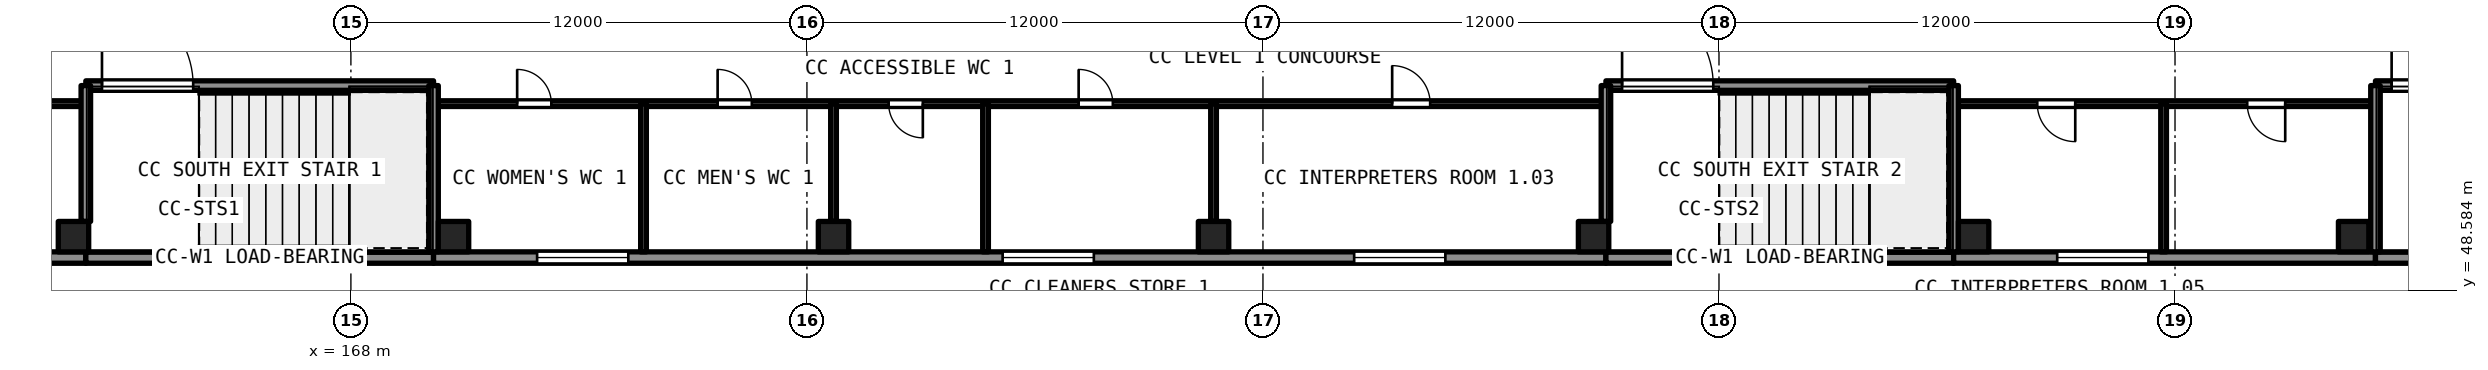
"""IFC4 building model, lengths in metres.
Left out: names, types, materials, properties, quantities, classifications, styles, units other than length and angle.
Written with IfcOpenShell. Run it as: python <this file> out.ifc"""

import sys

from ifc_helpers import new_model, si_unit, direction, frame, frame_2d, origin, origin_2d, place, context, subcontext, project, spatial, rectangle, extrude, element, fill, save


model = new_model("IFC4")
c1 = context("Model", 3, precision=1e-05, world=origin(), true_north=direction((0.0, 1.0)))
c2 = subcontext(c1, "Body", "Model", "MODEL_VIEW")
j1 = project(units=[si_unit("LENGTHUNIT", "METRE"), si_unit("PLANEANGLEUNIT", "RADIAN")], contexts=[c1])
p1 = place(None, origin())
s1 = spatial("IfcSite", under=j1, at=p1, CompositionType="ELEMENT")
p2 = place(p1, origin())
s2 = spatial("IfcBuilding", under=s1, at=p2, CompositionType="ELEMENT")
p3 = place(p2, frame((0.0, 0.0, 9.0)))
s3 = spatial("IfcBuildingStorey", under=s2, at=p3, CompositionType="ELEMENT", Elevation=9.0)
for number, where, z_axis, x_axis in (
    (1, (160.7, 50.0, 0.0), (0.0, 0.0, 1.0), (1.0, 0.0, 0.0)),
    (2, (170.7, 50.0, 0.0), (0.0, 0.0, 1.0), (1.0, 0.0, 0.0)),
    (3, (180.7, 50.0, 0.0), (0.0, 0.0, 1.0), (1.0, 0.0, 0.0)),
    (4, (190.7, 50.0, 0.0), (0.0, 0.0, 1.0), (1.0, 0.0, 0.0)),
    (5, (200.7, 50.0, 0.0), (0.0, 0.0, 1.0), (1.0, 0.0, 0.0)),
    (6, (210.7, 50.0, 0.0), (0.0, 0.0, 1.0), (1.0, 0.0, 0.0)),
    (7, (220.7, 50.0, 0.0), (0.0, 0.0, 1.0), (1.0, 0.0, 0.0)),
):
    element("IfcColumn", number, at=place(p3, frame(where, z_axis=z_axis, x_axis=x_axis)), inside=s3, PredefinedType="COLUMN", context=c2, shape_type="SweptSolid", body=[
        extrude(rectangle(XDim=0.8, YDim=0.8, at=origin_2d()), origin(), (0.0, 0.0, 1.0), 6.0),
    ])
p4 = place(p3, frame((150.15, 49.45, 0.0), z_axis=(0.0, 0.0, 1.0), x_axis=(1.0, 0.0, 0.0)))
e8 = element("IfcWall", 8, at=p4, inside=s3, PredefinedType="SOLIDWALL", context=c2, shape_type="SweptSolid", body=[
    extrude(rectangle(XDim=10.875, YDim=0.3, at=frame_2d((5.438, 0.0))), origin(), (0.0, 0.0, 1.0), 5.59),
])
p5 = place(p4, frame((4.25, 0.0, 0.9)))
e9 = element("IfcOpeningElement", 9, at=p5, cuts=e8, PredefinedType="OPENING", context=c2, shape_type="SweptSolid", body=[
    extrude(rectangle(XDim=2.4, YDim=1.8, at=frame_2d((1.2, 0.9))), frame((0.0, 0.161, 0.0), z_axis=(0.0, -1.0, 0.0), x_axis=(1.0, 0.0, 0.0)), (0.0, 0.0, 1.0), 0.321),
])
p6 = place(p3, frame((161.025, 49.45, 0.0), z_axis=(0.0, 0.0, 1.0), x_axis=(1.0, 0.0, 0.0)))
e10 = element("IfcWall", 10, at=p6, inside=s3, PredefinedType="SOLIDWALL", context=c2, shape_type="SweptSolid", body=[
    extrude(rectangle(XDim=9.15, YDim=0.3, at=frame_2d((4.575, 0.0))), origin(), (0.0, 0.0, 1.0), 5.59),
])
p7 = place(p6, frame((3.375, 0.0, 0.9)))
e11 = element("IfcOpeningElement", 11, at=p7, cuts=e10, PredefinedType="OPENING", context=c2, shape_type="SweptSolid", body=[
    extrude(rectangle(XDim=2.4, YDim=1.8, at=frame_2d((1.2, 0.9))), frame((0.0, 0.161, 0.0), z_axis=(0.0, -1.0, 0.0), x_axis=(1.0, 0.0, 0.0)), (0.0, 0.0, 1.0), 0.321),
])
p8 = place(p3, frame((170.175, 49.45, 0.0), z_axis=(0.0, 0.0, 1.0), x_axis=(1.0, 0.0, 0.0)))
e12 = element("IfcWall", 12, at=p8, inside=s3, PredefinedType="SOLIDWALL", context=c2, shape_type="SweptSolid", body=[
    extrude(rectangle(XDim=30.85, YDim=0.3, at=frame_2d((15.425, 0.0))), origin(), (0.0, 0.0, 1.0), 5.59),
])
p9 = place(p8, frame((2.725, 0.0, 0.9)))
e13 = element("IfcOpeningElement", 13, at=p9, cuts=e12, PredefinedType="OPENING", context=c2, shape_type="SweptSolid", body=[
    extrude(rectangle(XDim=2.4, YDim=1.8, at=frame_2d((1.2, 0.9))), frame((0.0, 0.161, 0.0), z_axis=(0.0, -1.0, 0.0), x_axis=(1.0, 0.0, 0.0)), (0.0, 0.0, 1.0), 0.321),
])
p10 = place(p8, frame((14.975, 0.0, 0.9)))
e14 = element("IfcOpeningElement", 14, at=p10, cuts=e12, PredefinedType="OPENING", context=c2, shape_type="SweptSolid", body=[
    extrude(rectangle(XDim=2.4, YDim=1.8, at=frame_2d((1.2, 0.9))), frame((0.0, 0.161, 0.0), z_axis=(0.0, -1.0, 0.0), x_axis=(1.0, 0.0, 0.0)), (0.0, 0.0, 1.0), 0.321),
])
p11 = place(p8, frame((24.225, 0.0, 0.9)))
e15 = element("IfcOpeningElement", 15, at=p11, cuts=e12, PredefinedType="OPENING", context=c2, shape_type="SweptSolid", body=[
    extrude(rectangle(XDim=2.4, YDim=1.8, at=frame_2d((1.2, 0.9))), frame((0.0, 0.161, 0.0), z_axis=(0.0, -1.0, 0.0), x_axis=(1.0, 0.0, 0.0)), (0.0, 0.0, 1.0), 0.321),
])
p12 = place(p3, frame((201.025, 49.45, 0.0), z_axis=(0.0, 0.0, 1.0), x_axis=(1.0, 0.0, 0.0)))
e16 = element("IfcWall", 16, at=p12, inside=s3, PredefinedType="SOLIDWALL", context=c2, shape_type="SweptSolid", body=[
    extrude(rectangle(XDim=9.15, YDim=0.3, at=frame_2d((4.575, 0.0))), origin(), (0.0, 0.0, 1.0), 5.59),
])
p13 = place(p12, frame((3.375, 0.0, 0.9)))
e17 = element("IfcOpeningElement", 17, at=p13, cuts=e16, PredefinedType="OPENING", context=c2, shape_type="SweptSolid", body=[
    extrude(rectangle(XDim=2.4, YDim=1.8, at=frame_2d((1.2, 0.9))), frame((0.0, 0.161, 0.0), z_axis=(0.0, -1.0, 0.0), x_axis=(1.0, 0.0, 0.0)), (0.0, 0.0, 1.0), 0.321),
])
p14 = place(p3, frame((210.175, 49.45, 0.0), z_axis=(0.0, 0.0, 1.0), x_axis=(1.0, 0.0, 0.0)))
e18 = element("IfcWall", 18, at=p14, inside=s3, PredefinedType="SOLIDWALL", context=c2, shape_type="SweptSolid", body=[
    extrude(rectangle(XDim=11.1, YDim=0.3, at=frame_2d((5.55, 0.0))), origin(), (0.0, 0.0, 1.0), 5.59),
])
p15 = place(p14, frame((2.725, 0.0, 0.9)))
e19 = element("IfcOpeningElement", 19, at=p15, cuts=e18, PredefinedType="OPENING", context=c2, shape_type="SweptSolid", body=[
    extrude(rectangle(XDim=2.4, YDim=1.8, at=frame_2d((1.2, 0.9))), frame((0.0, 0.161, 0.0), z_axis=(0.0, -1.0, 0.0), x_axis=(1.0, 0.0, 0.0)), (0.0, 0.0, 1.0), 0.321),
])
p16 = place(p3, frame((221.275, 49.45, 0.0), z_axis=(0.0, 0.0, 1.0), x_axis=(1.0, 0.0, 0.0)))
e20 = element("IfcWall", 20, at=p16, inside=s3, PredefinedType="SOLIDWALL", context=c2, shape_type="SweptSolid", body=[
    extrude(rectangle(XDim=9.425, YDim=0.3, at=frame_2d((4.712, 0.0))), origin(), (0.0, 0.0, 1.0), 5.59),
])
p17 = place(p16, frame((3.125, 0.0, 0.9)))
e21 = element("IfcOpeningElement", 21, at=p17, cuts=e20, PredefinedType="OPENING", context=c2, shape_type="SweptSolid", body=[
    extrude(rectangle(XDim=2.4, YDim=1.8, at=frame_2d((1.2, 0.9))), frame((0.0, 0.161, 0.0), z_axis=(0.0, -1.0, 0.0), x_axis=(1.0, 0.0, 0.0)), (0.0, 0.0, 1.0), 0.321),
])
p18 = place(p3, frame((150.3, 53.5, 0.0), z_axis=(0.0, 0.0, 1.0), x_axis=(1.0, 0.0, 0.0)))
e22 = element("IfcWall", 22, at=p18, inside=s3, PredefinedType="PARTITIONING", context=c2, shape_type="SweptSolid", body=[
    extrude(rectangle(XDim=10.725, YDim=0.15, at=frame_2d((5.362, 0.0))), origin(), (0.0, 0.0, 1.0), 5.59),
])
p19 = place(p18, frame((4.8, 0.0, 0.0)))
e23 = element("IfcOpeningElement", 23, at=p19, cuts=e22, PredefinedType="OPENING", context=c2, shape_type="SweptSolid", body=[
    extrude(rectangle(XDim=1.0, YDim=2.1, at=frame_2d((0.5, 1.05))), frame((0.0, 0.085, 0.0), z_axis=(0.0, -1.0, 0.0), x_axis=(1.0, 0.0, 0.0)), (0.0, 0.0, 1.0), 0.171),
])
p20 = place(p3, frame((170.175, 53.5, 0.0), z_axis=(0.0, 0.0, 1.0), x_axis=(1.0, 0.0, 0.0)))
e24 = element("IfcWall", 24, at=p20, inside=s3, PredefinedType="PARTITIONING", context=c2, shape_type="SweptSolid", body=[
    extrude(rectangle(XDim=30.85, YDim=0.15, at=frame_2d((15.425, 0.0))), origin(), (0.0, 0.0, 1.0), 5.59),
])
p21 = place(p20, frame((11.975, 0.0, 0.0)))
e25 = element("IfcOpeningElement", 25, at=p21, cuts=e24, PredefinedType="OPENING", context=c2, shape_type="SweptSolid", body=[
    extrude(rectangle(XDim=0.9, YDim=2.1, at=frame_2d((0.45, 1.05))), frame((0.0, 0.085, 0.0), z_axis=(0.0, -1.0, 0.0), x_axis=(1.0, 0.0, 0.0)), (0.0, 0.0, 1.0), 0.171),
])
p22 = place(p20, frame((16.975, 0.0, 0.0)))
e26 = element("IfcOpeningElement", 26, at=p22, cuts=e24, PredefinedType="OPENING", context=c2, shape_type="SweptSolid", body=[
    extrude(rectangle(XDim=0.9, YDim=2.1, at=frame_2d((0.45, 1.05))), frame((0.0, 0.085, 0.0), z_axis=(0.0, -1.0, 0.0), x_axis=(1.0, 0.0, 0.0)), (0.0, 0.0, 1.0), 0.171),
])
p23 = place(p20, frame((25.225, 0.0, 0.0)))
e27 = element("IfcOpeningElement", 27, at=p23, cuts=e24, PredefinedType="OPENING", context=c2, shape_type="SweptSolid", body=[
    extrude(rectangle(XDim=1.0, YDim=2.1, at=frame_2d((0.5, 1.05))), frame((0.0, 0.085, 0.0), z_axis=(0.0, -1.0, 0.0), x_axis=(1.0, 0.0, 0.0)), (0.0, 0.0, 1.0), 0.171),
])
p24 = place(p20, frame((7.475, 0.0, 0.0)))
e28 = element("IfcOpeningElement", 28, at=p24, cuts=e24, PredefinedType="OPENING", context=c2, shape_type="SweptSolid", body=[
    extrude(rectangle(XDim=0.9, YDim=2.1, at=frame_2d((0.45, 1.05))), frame((0.0, 0.085, 0.0), z_axis=(0.0, -1.0, 0.0), x_axis=(1.0, 0.0, 0.0)), (0.0, 0.0, 1.0), 0.171),
])
p25 = place(p20, frame((2.2, 0.0, 0.0)))
e29 = element("IfcOpeningElement", 29, at=p25, cuts=e24, PredefinedType="OPENING", context=c2, shape_type="SweptSolid", body=[
    extrude(rectangle(XDim=0.9, YDim=2.1, at=frame_2d((0.45, 1.05))), frame((0.0, 0.085, 0.0), z_axis=(0.0, -1.0, 0.0), x_axis=(1.0, 0.0, 0.0)), (0.0, 0.0, 1.0), 0.171),
])
p26 = place(p3, frame((210.175, 53.5, 0.0), z_axis=(0.0, 0.0, 1.0), x_axis=(1.0, 0.0, 0.0)))
e30 = element("IfcWall", 30, at=p26, inside=s3, PredefinedType="PARTITIONING", context=c2, shape_type="SweptSolid", body=[
    extrude(rectangle(XDim=11.1, YDim=0.15, at=frame_2d((5.55, 0.0))), origin(), (0.0, 0.0, 1.0), 5.59),
])
p27 = place(p26, frame((2.2, 0.0, 0.0)))
e31 = element("IfcOpeningElement", 31, at=p27, cuts=e30, PredefinedType="OPENING", context=c2, shape_type="SweptSolid", body=[
    extrude(rectangle(XDim=1.0, YDim=2.1, at=frame_2d((0.5, 1.05))), frame((0.0, 0.085, 0.0), z_axis=(0.0, -1.0, 0.0), x_axis=(1.0, 0.0, 0.0)), (0.0, 0.0, 1.0), 0.171),
])
p28 = place(p26, frame((7.725, 0.0, 0.0)))
e32 = element("IfcOpeningElement", 32, at=p28, cuts=e30, PredefinedType="OPENING", context=c2, shape_type="SweptSolid", body=[
    extrude(rectangle(XDim=1.0, YDim=2.1, at=frame_2d((0.5, 1.05))), frame((0.0, 0.085, 0.0), z_axis=(0.0, -1.0, 0.0), x_axis=(1.0, 0.0, 0.0)), (0.0, 0.0, 1.0), 0.171),
])
p29 = place(p3, frame((161.025, 53.975, 0.0), z_axis=(0.0, 0.0, 1.0), x_axis=(1.0, 0.0, 0.0)))
e33 = element("IfcWall", 33, at=p29, inside=s3, PredefinedType="SHEAR", context=c2, shape_type="SweptSolid", body=[
    extrude(rectangle(XDim=9.15, YDim=0.25, at=frame_2d((4.575, 0.0))), origin(), (0.0, 0.0, 1.0), 5.59),
])
p30 = place(p29, frame((0.425, 0.0, 0.0)))
e34 = element("IfcOpeningElement", 34, at=p30, cuts=e33, PredefinedType="OPENING", context=c2, shape_type="SweptSolid", body=[
    extrude(rectangle(XDim=2.4, YDim=2.1, at=frame_2d((1.2, 1.05))), frame((0.0, 0.135, 0.0), z_axis=(0.0, -1.0, 0.0), x_axis=(1.0, 0.0, 0.0)), (0.0, 0.0, 1.0), 0.271),
])
p31 = place(p3, frame((161.025, 50.4, 0.0), z_axis=(0.0, 0.0, 1.0), x_axis=(0.0, 1.0, 0.0)))
e35 = element("IfcWall", 35, at=p31, inside=s3, PredefinedType="SHEAR", context=c2, shape_type="SweptSolid", body=[
    extrude(rectangle(XDim=3.575, YDim=0.25, at=frame_2d((1.788, 0.0))), origin(), (0.0, 0.0, 1.0), 5.59),
])
p32 = place(p3, frame((170.175, 49.6, 0.0), z_axis=(0.0, 0.0, 1.0), x_axis=(0.0, 1.0, 0.0)))
e36 = element("IfcWall", 36, at=p32, inside=s3, PredefinedType="SHEAR", context=c2, shape_type="SweptSolid", body=[
    extrude(rectangle(XDim=4.375, YDim=0.25, at=frame_2d((2.188, 0.0))), origin(), (0.0, 0.0, 1.0), 5.59),
])
p33 = place(p3, frame((201.025, 53.975, 0.0), z_axis=(0.0, 0.0, 1.0), x_axis=(1.0, 0.0, 0.0)))
e37 = element("IfcWall", 37, at=p33, inside=s3, PredefinedType="SHEAR", context=c2, shape_type="SweptSolid", body=[
    extrude(rectangle(XDim=9.15, YDim=0.25, at=frame_2d((4.575, 0.0))), origin(), (0.0, 0.0, 1.0), 5.59),
])
p34 = place(p33, frame((0.425, 0.0, 0.0)))
e38 = element("IfcOpeningElement", 38, at=p34, cuts=e37, PredefinedType="OPENING", context=c2, shape_type="SweptSolid", body=[
    extrude(rectangle(XDim=2.4, YDim=2.1, at=frame_2d((1.2, 1.05))), frame((0.0, 0.135, 0.0), z_axis=(0.0, -1.0, 0.0), x_axis=(1.0, 0.0, 0.0)), (0.0, 0.0, 1.0), 0.271),
])
p35 = place(p3, frame((201.025, 50.4, 0.0), z_axis=(0.0, 0.0, 1.0), x_axis=(0.0, 1.0, 0.0)))
e39 = element("IfcWall", 39, at=p35, inside=s3, PredefinedType="SHEAR", context=c2, shape_type="SweptSolid", body=[
    extrude(rectangle(XDim=3.575, YDim=0.25, at=frame_2d((1.788, 0.0))), origin(), (0.0, 0.0, 1.0), 5.59),
])
p36 = place(p3, frame((210.175, 49.6, 0.0), z_axis=(0.0, 0.0, 1.0), x_axis=(0.0, 1.0, 0.0)))
e40 = element("IfcWall", 40, at=p36, inside=s3, PredefinedType="SHEAR", context=c2, shape_type="SweptSolid", body=[
    extrude(rectangle(XDim=4.375, YDim=0.25, at=frame_2d((2.188, 0.0))), origin(), (0.0, 0.0, 1.0), 5.59),
])
p37 = place(p3, frame((221.275, 53.975, 0.0), z_axis=(0.0, 0.0, 1.0), x_axis=(1.0, 0.0, 0.0)))
e41 = element("IfcWall", 41, at=p37, inside=s3, PredefinedType="SHEAR", context=c2, shape_type="SweptSolid", body=[
    extrude(rectangle(XDim=9.425, YDim=0.25, at=frame_2d((4.712, 0.0))), origin(), (0.0, 0.0, 1.0), 5.59),
])
p38 = place(p37, frame((0.425, 0.0, 0.0)))
e42 = element("IfcOpeningElement", 42, at=p38, cuts=e41, PredefinedType="OPENING", context=c2, shape_type="SweptSolid", body=[
    extrude(rectangle(XDim=2.4, YDim=2.1, at=frame_2d((1.2, 1.05))), frame((0.0, 0.135, 0.0), z_axis=(0.0, -1.0, 0.0), x_axis=(1.0, 0.0, 0.0)), (0.0, 0.0, 1.0), 0.271),
])
p39 = place(p3, frame((221.275, 49.6, 0.0), z_axis=(0.0, 0.0, 1.0), x_axis=(0.0, 1.0, 0.0)))
e43 = element("IfcWall", 43, at=p39, inside=s3, PredefinedType="SHEAR", context=c2, shape_type="SweptSolid", body=[
    extrude(rectangle(XDim=4.375, YDim=0.25, at=frame_2d((2.188, 0.0))), origin(), (0.0, 0.0, 1.0), 5.59),
])
p40 = place(p3, frame((175.7, 49.6, 0.0), z_axis=(0.0, 0.0, 1.0), x_axis=(0.0, 1.0, 0.0)))
e44 = element("IfcWall", 44, at=p40, inside=s3, PredefinedType="PARTITIONING", context=c2, shape_type="SweptSolid", body=[
    extrude(rectangle(XDim=3.9, YDim=0.15, at=frame_2d((1.95, 0.0))), origin(), (0.0, 0.0, 1.0), 5.59),
])
p41 = place(p3, frame((180.7, 50.4, 0.0), z_axis=(0.0, 0.0, 1.0), x_axis=(0.0, 1.0, 0.0)))
e45 = element("IfcWall", 45, at=p41, inside=s3, PredefinedType="PARTITIONING", context=c2, shape_type="SweptSolid", body=[
    extrude(rectangle(XDim=3.1, YDim=0.15, at=frame_2d((1.55, 0.0))), origin(), (0.0, 0.0, 1.0), 5.59),
])
p42 = place(p3, frame((184.7, 49.6, 0.0), z_axis=(0.0, 0.0, 1.0), x_axis=(0.0, 1.0, 0.0)))
e46 = element("IfcWall", 46, at=p42, inside=s3, PredefinedType="PARTITIONING", context=c2, shape_type="SweptSolid", body=[
    extrude(rectangle(XDim=3.9, YDim=0.15, at=frame_2d((1.95, 0.0))), origin(), (0.0, 0.0, 1.0), 5.59),
])
p43 = place(p3, frame((190.7, 50.4, 0.0), z_axis=(0.0, 0.0, 1.0), x_axis=(0.0, 1.0, 0.0)))
e47 = element("IfcWall", 47, at=p43, inside=s3, PredefinedType="PARTITIONING", context=c2, shape_type="SweptSolid", body=[
    extrude(rectangle(XDim=3.1, YDim=0.15, at=frame_2d((1.55, 0.0))), origin(), (0.0, 0.0, 1.0), 5.59),
])
p44 = place(p3, frame((215.7, 49.6, 0.0), z_axis=(0.0, 0.0, 1.0), x_axis=(0.0, 1.0, 0.0)))
e48 = element("IfcWall", 48, at=p44, inside=s3, PredefinedType="PARTITIONING", context=c2, shape_type="SweptSolid", body=[
    extrude(rectangle(XDim=3.9, YDim=0.15, at=frame_2d((1.95, 0.0))), origin(), (0.0, 0.0, 1.0), 5.59),
])
p45 = place(p21, origin())
e49 = element("IfcDoor", 49, at=p45, inside=s3, OperationType="SINGLE_SWING_RIGHT", PredefinedType="DOOR", context=c2, shape_type="SweptSolid", body=[
    extrude(rectangle(XDim=0.9, YDim=2.1, at=frame_2d((0.45, 1.05))), frame((0.0, 0.025, 0.0), z_axis=(0.0, -1.0, 0.0), x_axis=(1.0, 0.0, 0.0)), (0.0, 0.0, 1.0), 0.05),
])
fill(e25, e49)
p46 = place(p22, origin())
e50 = element("IfcDoor", 50, at=p46, inside=s3, OperationType="SINGLE_SWING_LEFT", PredefinedType="DOOR", context=c2, shape_type="SweptSolid", body=[
    extrude(rectangle(XDim=0.9, YDim=2.1, at=frame_2d((0.45, 1.05))), frame((0.0, 0.025, 0.0), z_axis=(0.0, -1.0, 0.0), x_axis=(1.0, 0.0, 0.0)), (0.0, 0.0, 1.0), 0.05),
])
fill(e26, e50)
p47 = place(p23, origin())
e51 = element("IfcDoor", 51, at=p47, inside=s3, OperationType="SINGLE_SWING_LEFT", PredefinedType="DOOR", context=c2, shape_type="SweptSolid", body=[
    extrude(rectangle(XDim=1.0, YDim=2.1, at=frame_2d((0.5, 1.05))), frame((0.0, 0.025, 0.0), z_axis=(0.0, -1.0, 0.0), x_axis=(1.0, 0.0, 0.0)), (0.0, 0.0, 1.0), 0.05),
])
fill(e27, e51)
p48 = place(p27, origin())
e52 = element("IfcDoor", 52, at=p48, inside=s3, OperationType="SINGLE_SWING_RIGHT", PredefinedType="DOOR", context=c2, shape_type="SweptSolid", body=[
    extrude(rectangle(XDim=1.0, YDim=2.1, at=frame_2d((0.5, 1.05))), frame((0.0, 0.025, 0.0), z_axis=(0.0, -1.0, 0.0), x_axis=(1.0, 0.0, 0.0)), (0.0, 0.0, 1.0), 0.05),
])
fill(e31, e52)
p49 = place(p24, origin())
e53 = element("IfcDoor", 53, at=p49, inside=s3, OperationType="SINGLE_SWING_LEFT", PredefinedType="DOOR", context=c2, shape_type="SweptSolid", body=[
    extrude(rectangle(XDim=0.9, YDim=2.1, at=frame_2d((0.45, 1.05))), frame((0.0, 0.025, 0.0), z_axis=(0.0, -1.0, 0.0), x_axis=(1.0, 0.0, 0.0)), (0.0, 0.0, 1.0), 0.05),
])
fill(e28, e53)
p50 = place(p28, origin())
e54 = element("IfcDoor", 54, at=p50, inside=s3, OperationType="SINGLE_SWING_RIGHT", PredefinedType="DOOR", context=c2, shape_type="SweptSolid", body=[
    extrude(rectangle(XDim=1.0, YDim=2.1, at=frame_2d((0.5, 1.05))), frame((0.0, 0.025, 0.0), z_axis=(0.0, -1.0, 0.0), x_axis=(1.0, 0.0, 0.0)), (0.0, 0.0, 1.0), 0.05),
])
fill(e32, e54)
p51 = place(p25, origin())
e55 = element("IfcDoor", 55, at=p51, inside=s3, OperationType="SINGLE_SWING_LEFT", PredefinedType="DOOR", context=c2, shape_type="SweptSolid", body=[
    extrude(rectangle(XDim=0.9, YDim=2.1, at=frame_2d((0.45, 1.05))), frame((0.0, 0.025, 0.0), z_axis=(0.0, -1.0, 0.0), x_axis=(1.0, 0.0, 0.0)), (0.0, 0.0, 1.0), 0.05),
])
fill(e29, e55)
p52 = place(p30, origin())
e56 = element("IfcDoor", 56, at=p52, inside=s3, OperationType="DOUBLE_DOOR_SINGLE_SWING", PredefinedType="DOOR", context=c2, shape_type="SweptSolid", body=[
    extrude(rectangle(XDim=2.4, YDim=2.1, at=frame_2d((1.2, 1.05))), frame((0.0, 0.025, 0.0), z_axis=(0.0, -1.0, 0.0), x_axis=(1.0, 0.0, 0.0)), (0.0, 0.0, 1.0), 0.05),
])
fill(e34, e56)
p53 = place(p34, origin())
e57 = element("IfcDoor", 57, at=p53, inside=s3, OperationType="DOUBLE_DOOR_SINGLE_SWING", PredefinedType="DOOR", context=c2, shape_type="SweptSolid", body=[
    extrude(rectangle(XDim=2.4, YDim=2.1, at=frame_2d((1.2, 1.05))), frame((0.0, 0.025, 0.0), z_axis=(0.0, -1.0, 0.0), x_axis=(1.0, 0.0, 0.0)), (0.0, 0.0, 1.0), 0.05),
])
fill(e38, e57)
p54 = place(p38, origin())
e58 = element("IfcDoor", 58, at=p54, inside=s3, OperationType="DOUBLE_DOOR_SINGLE_SWING", PredefinedType="DOOR", context=c2, shape_type="SweptSolid", body=[
    extrude(rectangle(XDim=2.4, YDim=2.1, at=frame_2d((1.2, 1.05))), frame((0.0, 0.025, 0.0), z_axis=(0.0, -1.0, 0.0), x_axis=(1.0, 0.0, 0.0)), (0.0, 0.0, 1.0), 0.05),
])
fill(e42, e58)
p55 = place(p7, origin())
e59 = element("IfcWindow", 59, at=p55, inside=s3, PartitioningType="DOUBLE_PANEL_VERTICAL", PredefinedType="WINDOW", context=c2, shape_type="SweptSolid", body=[
    extrude(rectangle(XDim=2.4, YDim=1.8, at=frame_2d((1.2, 0.9))), frame((0.0, 0.03, 0.0), z_axis=(0.0, -1.0, 0.0), x_axis=(1.0, 0.0, 0.0)), (0.0, 0.0, 1.0), 0.06),
])
fill(e11, e59)
p56 = place(p9, origin())
e60 = element("IfcWindow", 60, at=p56, inside=s3, PartitioningType="DOUBLE_PANEL_VERTICAL", PredefinedType="WINDOW", context=c2, shape_type="SweptSolid", body=[
    extrude(rectangle(XDim=2.4, YDim=1.8, at=frame_2d((1.2, 0.9))), frame((0.0, 0.03, 0.0), z_axis=(0.0, -1.0, 0.0), x_axis=(1.0, 0.0, 0.0)), (0.0, 0.0, 1.0), 0.06),
])
fill(e13, e60)
p57 = place(p10, origin())
e61 = element("IfcWindow", 61, at=p57, inside=s3, PartitioningType="DOUBLE_PANEL_VERTICAL", PredefinedType="WINDOW", context=c2, shape_type="SweptSolid", body=[
    extrude(rectangle(XDim=2.4, YDim=1.8, at=frame_2d((1.2, 0.9))), frame((0.0, 0.03, 0.0), z_axis=(0.0, -1.0, 0.0), x_axis=(1.0, 0.0, 0.0)), (0.0, 0.0, 1.0), 0.06),
])
fill(e14, e61)
p58 = place(p11, origin())
e62 = element("IfcWindow", 62, at=p58, inside=s3, PartitioningType="DOUBLE_PANEL_VERTICAL", PredefinedType="WINDOW", context=c2, shape_type="SweptSolid", body=[
    extrude(rectangle(XDim=2.4, YDim=1.8, at=frame_2d((1.2, 0.9))), frame((0.0, 0.03, 0.0), z_axis=(0.0, -1.0, 0.0), x_axis=(1.0, 0.0, 0.0)), (0.0, 0.0, 1.0), 0.06),
])
fill(e15, e62)
p59 = place(p13, origin())
e63 = element("IfcWindow", 63, at=p59, inside=s3, PartitioningType="DOUBLE_PANEL_VERTICAL", PredefinedType="WINDOW", context=c2, shape_type="SweptSolid", body=[
    extrude(rectangle(XDim=2.4, YDim=1.8, at=frame_2d((1.2, 0.9))), frame((0.0, 0.03, 0.0), z_axis=(0.0, -1.0, 0.0), x_axis=(1.0, 0.0, 0.0)), (0.0, 0.0, 1.0), 0.06),
])
fill(e17, e63)
p60 = place(p15, origin())
e64 = element("IfcWindow", 64, at=p60, inside=s3, PartitioningType="DOUBLE_PANEL_VERTICAL", PredefinedType="WINDOW", context=c2, shape_type="SweptSolid", body=[
    extrude(rectangle(XDim=2.4, YDim=1.8, at=frame_2d((1.2, 0.9))), frame((0.0, 0.03, 0.0), z_axis=(0.0, -1.0, 0.0), x_axis=(1.0, 0.0, 0.0)), (0.0, 0.0, 1.0), 0.06),
])
fill(e19, e64)
save(model, sys.argv[1])
